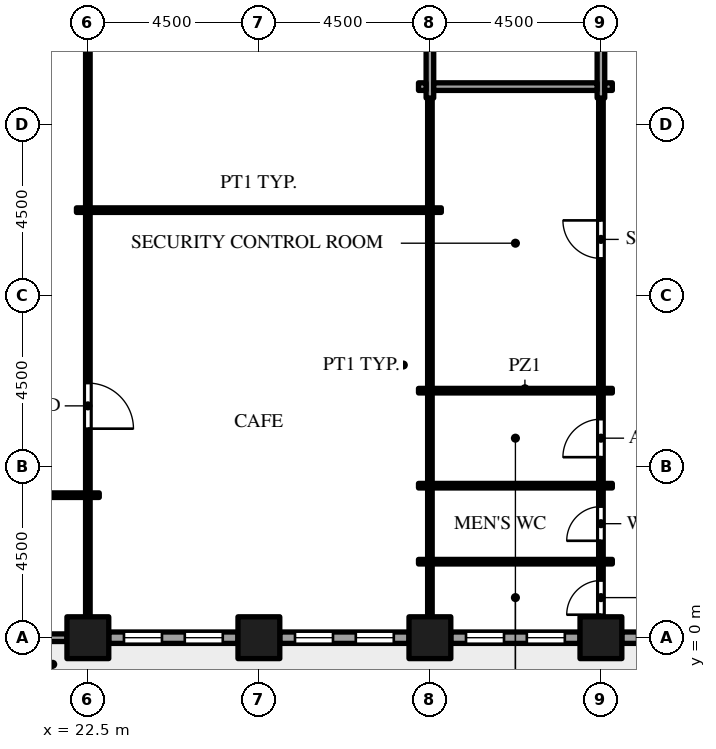
"""IFC4 building model, lengths in metres.
Left out: names, types, materials, properties, quantities, classifications, styles, units other than length and angle.
Written with IfcOpenShell. Run it as: python <this file> out.ifc"""

import sys

from ifc_helpers import new_model, si_unit, direction, frame, frame_2d, origin, origin_2d, place, context, subcontext, project, spatial, rectangle, hollow_rectangle, extrude, element, fill, save


model = new_model("IFC4")
c1 = context("Model", 3, precision=1e-05, world=origin(), true_north=direction((0.0, 1.0)))
c2 = subcontext(c1, "Body", "Model", "MODEL_VIEW")
j1 = project(units=[si_unit("LENGTHUNIT", "METRE"), si_unit("PLANEANGLEUNIT", "RADIAN")], contexts=[c1])
p1 = place(None, origin())
s1 = spatial("IfcSite", under=j1, at=p1, CompositionType="ELEMENT")
p2 = place(p1, origin())
s2 = spatial("IfcBuilding", under=s1, at=p2, CompositionType="ELEMENT")
p3 = place(p2, origin())
s3 = spatial("IfcBuildingStorey", under=s2, at=p3, CompositionType="ELEMENT", Elevation=0.0)
for number, where, z_axis, x_axis in (
    (1, (22.5, 0.0, -0.3), (0.0, 0.0, 1.0), (1.0, 0.0, 0.0)),
    (2, (27.0, 0.0, -0.3), (0.0, 0.0, 1.0), (1.0, 0.0, 0.0)),
    (3, (31.5, 0.0, -0.3), (0.0, 0.0, 1.0), (1.0, 0.0, 0.0)),
    (4, (36.0, 0.0, -0.3), (0.0, 0.0, 1.0), (1.0, 0.0, 0.0)),
):
    element("IfcColumn", number, at=place(p3, frame(where, z_axis=z_axis, x_axis=x_axis)), inside=s3, PredefinedType="COLUMN", context=c2, shape_type="SweptSolid", body=[
        extrude(hollow_rectangle(XDim=1.1, YDim=1.1, WallThickness=0.06, at=origin_2d()), origin(), (0.0, 0.0, 1.0), 8.05),
    ])
p4 = place(p3, frame((21.95, 0.0, 0.0), z_axis=(0.0, 0.0, 1.0), x_axis=(-1.0, 0.0, 0.0)))
e5 = element("IfcWall", 5, at=p4, inside=s3, PredefinedType="STANDARD", context=c2, shape_type="SweptSolid", body=[
    extrude(rectangle(XDim=3.4, YDim=0.2, at=frame_2d((1.7, 0.0))), origin(), (0.0, 0.0, 1.0), 7.036),
])
p5 = place(p4, frame((1.1, 0.0, 0.0)))
e6 = element("IfcOpeningElement", 6, at=p5, cuts=e5, PredefinedType="OPENING", context=c2, shape_type="SweptSolid", body=[
    extrude(rectangle(XDim=1.2, YDim=2.4, at=frame_2d((0.6, 1.2))), frame((0.0, 0.11, 0.0), z_axis=(0.0, -1.0, 0.0), x_axis=(1.0, 0.0, 0.0)), (0.0, 0.0, 1.0), 0.22),
])
p6 = place(p3, frame((23.05, 0.0, 0.0), z_axis=(0.0, 0.0, 1.0), x_axis=(1.0, 0.0, 0.0)))
e7 = element("IfcWall", 7, at=p6, inside=s3, PredefinedType="STANDARD", context=c2, shape_type="SweptSolid", body=[
    extrude(rectangle(XDim=3.4, YDim=0.3, at=frame_2d((1.7, 0.0))), origin(), (0.0, 0.0, 1.0), 7.036),
])
p7 = place(p6, frame((0.4, 0.0, 0.9)))
e8 = element("IfcOpeningElement", 8, at=p7, cuts=e7, PredefinedType="OPENING", context=c2, shape_type="SweptSolid", body=[
    extrude(rectangle(XDim=1.0, YDim=3.5, at=frame_2d((0.5, 1.75))), frame((0.0, 0.16, 0.0), z_axis=(0.0, -1.0, 0.0), x_axis=(1.0, 0.0, 0.0)), (0.0, 0.0, 1.0), 0.32),
])
p8 = place(p6, frame((2.0, 0.0, 0.9)))
e9 = element("IfcOpeningElement", 9, at=p8, cuts=e7, PredefinedType="OPENING", context=c2, shape_type="SweptSolid", body=[
    extrude(rectangle(XDim=1.0, YDim=3.5, at=frame_2d((0.5, 1.75))), frame((0.0, 0.16, 0.0), z_axis=(0.0, -1.0, 0.0), x_axis=(1.0, 0.0, 0.0)), (0.0, 0.0, 1.0), 0.32),
])
p9 = place(p3, frame((27.55, 0.0, 0.0), z_axis=(0.0, 0.0, 1.0), x_axis=(1.0, 0.0, 0.0)))
e10 = element("IfcWall", 10, at=p9, inside=s3, PredefinedType="STANDARD", context=c2, shape_type="SweptSolid", body=[
    extrude(rectangle(XDim=3.4, YDim=0.3, at=frame_2d((1.7, 0.0))), origin(), (0.0, 0.0, 1.0), 7.036),
])
p10 = place(p9, frame((0.4, 0.0, 0.9)))
e11 = element("IfcOpeningElement", 11, at=p10, cuts=e10, PredefinedType="OPENING", context=c2, shape_type="SweptSolid", body=[
    extrude(rectangle(XDim=1.0, YDim=3.5, at=frame_2d((0.5, 1.75))), frame((0.0, 0.16, 0.0), z_axis=(0.0, -1.0, 0.0), x_axis=(1.0, 0.0, 0.0)), (0.0, 0.0, 1.0), 0.32),
])
p11 = place(p9, frame((2.0, 0.0, 0.9)))
e12 = element("IfcOpeningElement", 12, at=p11, cuts=e10, PredefinedType="OPENING", context=c2, shape_type="SweptSolid", body=[
    extrude(rectangle(XDim=1.0, YDim=3.5, at=frame_2d((0.5, 1.75))), frame((0.0, 0.16, 0.0), z_axis=(0.0, -1.0, 0.0), x_axis=(1.0, 0.0, 0.0)), (0.0, 0.0, 1.0), 0.32),
])
p12 = place(p3, frame((32.05, 0.0, 0.0), z_axis=(0.0, 0.0, 1.0), x_axis=(1.0, 0.0, 0.0)))
e13 = element("IfcWall", 13, at=p12, inside=s3, PredefinedType="STANDARD", context=c2, shape_type="SweptSolid", body=[
    extrude(rectangle(XDim=3.4, YDim=0.3, at=frame_2d((1.7, 0.0))), origin(), (0.0, 0.0, 1.0), 7.036),
])
p13 = place(p12, frame((0.4, 0.0, 0.9)))
e14 = element("IfcOpeningElement", 14, at=p13, cuts=e13, PredefinedType="OPENING", context=c2, shape_type="SweptSolid", body=[
    extrude(rectangle(XDim=1.0, YDim=3.5, at=frame_2d((0.5, 1.75))), frame((0.0, 0.16, 0.0), z_axis=(0.0, -1.0, 0.0), x_axis=(1.0, 0.0, 0.0)), (0.0, 0.0, 1.0), 0.32),
])
p14 = place(p12, frame((2.0, 0.0, 0.9)))
e15 = element("IfcOpeningElement", 15, at=p14, cuts=e13, PredefinedType="OPENING", context=c2, shape_type="SweptSolid", body=[
    extrude(rectangle(XDim=1.0, YDim=3.5, at=frame_2d((0.5, 1.75))), frame((0.0, 0.16, 0.0), z_axis=(0.0, -1.0, 0.0), x_axis=(1.0, 0.0, 0.0)), (0.0, 0.0, 1.0), 0.32),
])
p15 = place(p3, frame((36.55, 0.0, 0.0), z_axis=(0.0, 0.0, 1.0), x_axis=(1.0, 0.0, 0.0)))
e16 = element("IfcWall", 16, at=p15, inside=s3, PredefinedType="STANDARD", context=c2, shape_type="SweptSolid", body=[
    extrude(rectangle(XDim=3.4, YDim=0.3, at=frame_2d((1.7, 0.0))), origin(), (0.0, 0.0, 1.0), 7.036),
])
p16 = place(p15, frame((0.4, 0.0, 0.9)))
e17 = element("IfcOpeningElement", 17, at=p16, cuts=e16, PredefinedType="OPENING", context=c2, shape_type="SweptSolid", body=[
    extrude(rectangle(XDim=1.0, YDim=3.5, at=frame_2d((0.5, 1.75))), frame((0.0, 0.16, 0.0), z_axis=(0.0, -1.0, 0.0), x_axis=(1.0, 0.0, 0.0)), (0.0, 0.0, 1.0), 0.32),
])
p17 = place(p15, frame((2.0, 0.0, 0.9)))
e18 = element("IfcOpeningElement", 18, at=p17, cuts=e16, PredefinedType="OPENING", context=c2, shape_type="SweptSolid", body=[
    extrude(rectangle(XDim=1.0, YDim=3.5, at=frame_2d((0.5, 1.75))), frame((0.0, 0.16, 0.0), z_axis=(0.0, -1.0, 0.0), x_axis=(1.0, 0.0, 0.0)), (0.0, 0.0, 1.0), 0.32),
])
p18 = place(p3, frame((22.5, 0.15, 0.0), z_axis=(0.0, 0.0, 1.0), x_axis=(0.0, 1.0, 0.0)))
e19 = element("IfcWall", 19, at=p18, inside=s3, PredefinedType="PARTITIONING", context=c2, shape_type="SweptSolid", body=[
    extrude(rectangle(XDim=32.85, YDim=0.12, at=frame_2d((16.425, 0.0))), origin(), (0.0, 0.0, 1.0), 6.759),
])
p19 = place(p18, frame((5.35, 0.0, 0.0)))
e20 = element("IfcOpeningElement", 20, at=p19, cuts=e19, PredefinedType="OPENING", context=c2, shape_type="SweptSolid", body=[
    extrude(rectangle(XDim=1.2, YDim=2.1, at=frame_2d((0.6, 1.05))), frame((0.0, 0.07, 0.0), z_axis=(0.0, -1.0, 0.0), x_axis=(1.0, 0.0, 0.0)), (0.0, 0.0, 1.0), 0.14),
])
p20 = place(p18, frame((16.155, 0.0, 0.0)))
e21 = element("IfcOpeningElement", 21, at=p20, cuts=e19, PredefinedType="OPENING", context=c2, shape_type="SweptSolid", body=[
    extrude(rectangle(XDim=1.2, YDim=2.1, at=frame_2d((0.6, 1.05))), frame((0.0, 0.07, 0.0), z_axis=(0.0, -1.0, 0.0), x_axis=(1.0, 0.0, 0.0)), (0.0, 0.0, 1.0), 0.14),
])
p21 = place(p18, frame((30.15, 0.0, 0.0)))
e22 = element("IfcOpeningElement", 22, at=p21, cuts=e19, PredefinedType="OPENING", context=c2, shape_type="SweptSolid", body=[
    extrude(rectangle(XDim=1.8, YDim=2.1, at=frame_2d((0.9, 1.05))), frame((0.0, 0.07, 0.0), z_axis=(0.0, -1.0, 0.0), x_axis=(1.0, 0.0, 0.0)), (0.0, 0.0, 1.0), 0.14),
])
p22 = place(p3, frame((31.5, 0.15, 0.0), z_axis=(0.0, 0.0, 1.0), x_axis=(0.0, 1.0, 0.0)))
e23 = element("IfcWall", 23, at=p22, inside=s3, PredefinedType="PARTITIONING", context=c2, shape_type="SweptSolid", body=[
    extrude(rectangle(XDim=14.05, YDim=0.12, at=frame_2d((7.025, 0.0))), origin(), (0.0, 0.0, 1.0), 6.759),
])
p23 = place(p3, frame((31.5, 14.2, 0.0), z_axis=(0.0, 0.0, 1.0), x_axis=(0.0, 1.0, 0.0)))
e24 = element("IfcWall", 24, at=p23, inside=s3, PredefinedType="PARTITIONING", context=c2, shape_type="SweptSolid", body=[
    extrude(rectangle(XDim=8.6, YDim=0.2, at=frame_2d((4.3, 0.0))), origin(), (0.0, 0.0, 1.0), 6.759),
])
p24 = place(p3, frame((36.0, 0.15, 0.0), z_axis=(0.0, 0.0, 1.0), x_axis=(0.0, 1.0, 0.0)))
e25 = element("IfcWall", 25, at=p24, inside=s3, PredefinedType="PARTITIONING", context=c2, shape_type="SweptSolid", body=[
    extrude(rectangle(XDim=14.05, YDim=0.12, at=frame_2d((7.025, 0.0))), origin(), (0.0, 0.0, 1.0), 6.759),
])
p25 = place(p24, frame((9.83, 0.0, 0.0)))
e26 = element("IfcOpeningElement", 26, at=p25, cuts=e25, PredefinedType="OPENING", context=c2, shape_type="SweptSolid", body=[
    extrude(rectangle(XDim=1.0, YDim=2.1, at=frame_2d((0.5, 1.05))), frame((0.0, 0.07, 0.0), z_axis=(0.0, -1.0, 0.0), x_axis=(1.0, 0.0, 0.0)), (0.0, 0.0, 1.0), 0.14),
])
p26 = place(p24, frame((0.455, 0.0, 0.0)))
e27 = element("IfcOpeningElement", 27, at=p26, cuts=e25, PredefinedType="OPENING", context=c2, shape_type="SweptSolid", body=[
    extrude(rectangle(XDim=0.9, YDim=2.1, at=frame_2d((0.45, 1.05))), frame((0.0, 0.07, 0.0), z_axis=(0.0, -1.0, 0.0), x_axis=(1.0, 0.0, 0.0)), (0.0, 0.0, 1.0), 0.14),
])
p27 = place(p24, frame((2.4, 0.0, 0.0)))
e28 = element("IfcOpeningElement", 28, at=p27, cuts=e25, PredefinedType="OPENING", context=c2, shape_type="SweptSolid", body=[
    extrude(rectangle(XDim=0.9, YDim=2.1, at=frame_2d((0.45, 1.05))), frame((0.0, 0.07, 0.0), z_axis=(0.0, -1.0, 0.0), x_axis=(1.0, 0.0, 0.0)), (0.0, 0.0, 1.0), 0.14),
])
p28 = place(p24, frame((4.6, 0.0, 0.0)))
e29 = element("IfcOpeningElement", 29, at=p28, cuts=e25, PredefinedType="OPENING", context=c2, shape_type="SweptSolid", body=[
    extrude(rectangle(XDim=1.0, YDim=2.1, at=frame_2d((0.5, 1.05))), frame((0.0, 0.07, 0.0), z_axis=(0.0, -1.0, 0.0), x_axis=(1.0, 0.0, 0.0)), (0.0, 0.0, 1.0), 0.14),
])
p29 = place(p3, frame((36.0, 14.2, 0.0), z_axis=(0.0, 0.0, 1.0), x_axis=(0.0, 1.0, 0.0)))
e30 = element("IfcWall", 30, at=p29, inside=s3, PredefinedType="PARTITIONING", context=c2, shape_type="SweptSolid", body=[
    extrude(rectangle(XDim=8.6, YDim=0.2, at=frame_2d((4.3, 0.0))), origin(), (0.0, 0.0, 1.0), 6.759),
])
p30 = place(p29, frame((3.8, 0.0, 0.0)))
e31 = element("IfcOpeningElement", 31, at=p30, cuts=e30, PredefinedType="OPENING", context=c2, shape_type="SweptSolid", body=[
    extrude(rectangle(XDim=1.0, YDim=2.1, at=frame_2d((0.5, 1.05))), frame((0.0, 0.11, 0.0), z_axis=(0.0, -1.0, 0.0), x_axis=(1.0, 0.0, 0.0)), (0.0, 0.0, 1.0), 0.22),
])
p31 = place(p3, frame((31.2, 2.0, 0.0), z_axis=(0.0, 0.0, 1.0), x_axis=(1.0, 0.0, 0.0)))
e32 = element("IfcWall", 32, at=p31, inside=s3, PredefinedType="PARTITIONING", context=c2, shape_type="SweptSolid", body=[
    extrude(rectangle(XDim=0.24, YDim=0.12, at=frame_2d((0.12, 0.0))), origin(), (0.0, 0.0, 1.0), 6.759),
])
p32 = place(p3, frame((31.56, 2.0, 0.0), z_axis=(0.0, 0.0, 1.0), x_axis=(1.0, 0.0, 0.0)))
e33 = element("IfcWall", 33, at=p32, inside=s3, PredefinedType="PARTITIONING", context=c2, shape_type="SweptSolid", body=[
    extrude(rectangle(XDim=4.38, YDim=0.12, at=frame_2d((2.19, 0.0))), origin(), (0.0, 0.0, 1.0), 6.66),
])
p33 = place(p3, frame((36.06, 2.0, 0.0), z_axis=(0.0, 0.0, 1.0), x_axis=(1.0, 0.0, 0.0)))
e34 = element("IfcWall", 34, at=p33, inside=s3, PredefinedType="PARTITIONING", context=c2, shape_type="SweptSolid", body=[
    extrude(rectangle(XDim=0.24, YDim=0.12, at=frame_2d((0.12, 0.0))), origin(), (0.0, 0.0, 1.0), 6.759),
])
p34 = place(p3, frame((15.81, 3.75, 0.0), z_axis=(0.0, 0.0, 1.0), x_axis=(1.0, 0.0, 0.0)))
e35 = element("IfcWall", 35, at=p34, inside=s3, PredefinedType="PARTITIONING", context=c2, shape_type="SweptSolid", body=[
    extrude(rectangle(XDim=6.63, YDim=0.12, at=frame_2d((3.315, 0.0))), origin(), (0.0, 0.0, 1.0), 6.759),
])
p35 = place(p34, frame((2.815, 0.0, 0.0)))
e36 = element("IfcOpeningElement", 36, at=p35, cuts=e35, PredefinedType="OPENING", context=c2, shape_type="SweptSolid", body=[
    extrude(rectangle(XDim=1.0, YDim=2.1, at=frame_2d((0.5, 1.05))), frame((0.0, 0.07, 0.0), z_axis=(0.0, -1.0, 0.0), x_axis=(1.0, 0.0, 0.0)), (0.0, 0.0, 1.0), 0.14),
])
for number, where, z_axis, x_axis in (
    (37, (22.56, 3.75, 0.0), (0.0, 0.0, 1.0), (1.0, 0.0, 0.0)),
    (38, (31.2, 4.0, 0.0), (0.0, 0.0, 1.0), (1.0, 0.0, 0.0)),
):
    element("IfcWall", number, at=place(p3, frame(where, z_axis=z_axis, x_axis=x_axis)), inside=s3, PredefinedType="PARTITIONING", context=c2, shape_type="SweptSolid", body=[
        extrude(rectangle(XDim=0.24, YDim=0.12, at=frame_2d((0.12, 0.0))), origin(), (0.0, 0.0, 1.0), 6.759),
    ])
p36 = place(p3, frame((31.56, 4.0, 0.0), z_axis=(0.0, 0.0, 1.0), x_axis=(1.0, 0.0, 0.0)))
e39 = element("IfcWall", 39, at=p36, inside=s3, PredefinedType="PARTITIONING", context=c2, shape_type="SweptSolid", body=[
    extrude(rectangle(XDim=4.38, YDim=0.12, at=frame_2d((2.19, 0.0))), origin(), (0.0, 0.0, 1.0), 6.66),
])
for number, where, z_axis, x_axis in (
    (40, (36.06, 4.0, 0.0), (0.0, 0.0, 1.0), (1.0, 0.0, 0.0)),
    (41, (31.2, 6.5, 0.0), (0.0, 0.0, 1.0), (1.0, 0.0, 0.0)),
):
    element("IfcWall", number, at=place(p3, frame(where, z_axis=z_axis, x_axis=x_axis)), inside=s3, PredefinedType="PARTITIONING", context=c2, shape_type="SweptSolid", body=[
        extrude(rectangle(XDim=0.24, YDim=0.12, at=frame_2d((0.12, 0.0))), origin(), (0.0, 0.0, 1.0), 6.759),
    ])
p37 = place(p3, frame((31.56, 6.5, 0.0), z_axis=(0.0, 0.0, 1.0), x_axis=(1.0, 0.0, 0.0)))
e42 = element("IfcWall", 42, at=p37, inside=s3, PredefinedType="PARTITIONING", context=c2, shape_type="SweptSolid", body=[
    extrude(rectangle(XDim=4.38, YDim=0.12, at=frame_2d((2.19, 0.0))), origin(), (0.0, 0.0, 1.0), 6.66),
])
for number, where, z_axis, x_axis in (
    (43, (36.06, 6.5, 0.0), (0.0, 0.0, 1.0), (1.0, 0.0, 0.0)),
    (44, (22.2, 11.25, 0.0), (0.0, 0.0, 1.0), (1.0, 0.0, 0.0)),
):
    element("IfcWall", number, at=place(p3, frame(where, z_axis=z_axis, x_axis=x_axis)), inside=s3, PredefinedType="PARTITIONING", context=c2, shape_type="SweptSolid", body=[
        extrude(rectangle(XDim=0.24, YDim=0.12, at=frame_2d((0.12, 0.0))), origin(), (0.0, 0.0, 1.0), 6.759),
    ])
p38 = place(p3, frame((22.56, 11.25, 0.0), z_axis=(0.0, 0.0, 1.0), x_axis=(1.0, 0.0, 0.0)))
e45 = element("IfcWall", 45, at=p38, inside=s3, PredefinedType="PARTITIONING", context=c2, shape_type="SweptSolid", body=[
    extrude(rectangle(XDim=8.88, YDim=0.12, at=frame_2d((4.44, 0.0))), origin(), (0.0, 0.0, 1.0), 6.66),
])
p39 = place(p3, frame((31.56, 11.25, 0.0), z_axis=(0.0, 0.0, 1.0), x_axis=(1.0, 0.0, 0.0)))
e46 = element("IfcWall", 46, at=p39, inside=s3, PredefinedType="PARTITIONING", context=c2, shape_type="SweptSolid", body=[
    extrude(rectangle(XDim=0.24, YDim=0.12, at=frame_2d((0.12, 0.0))), origin(), (0.0, 0.0, 1.0), 6.759),
])
p40 = place(p3, frame((31.2, 14.5, 0.0), z_axis=(0.0, 0.0, 1.0), x_axis=(1.0, 0.0, 0.0)))
e47 = element("IfcWall", 47, at=p40, inside=s3, PredefinedType="PARTITIONING", context=c2, shape_type="SweptSolid", body=[
    extrude(rectangle(XDim=0.2, YDim=0.2, at=frame_2d((0.1, 0.0))), origin(), (0.0, 0.0, 1.0), 6.759),
])
p41 = place(p3, frame((31.6, 14.5, 0.0), z_axis=(0.0, 0.0, 1.0), x_axis=(1.0, 0.0, 0.0)))
e48 = element("IfcWall", 48, at=p41, inside=s3, PredefinedType="PARTITIONING", context=c2, shape_type="SweptSolid", body=[
    extrude(rectangle(XDim=4.3, YDim=0.2, at=frame_2d((2.15, 0.0))), origin(), (0.0, 0.0, 1.0), 6.66),
])
p42 = place(p3, frame((36.1, 14.5, 0.0), z_axis=(0.0, 0.0, 1.0), x_axis=(1.0, 0.0, 0.0)))
e49 = element("IfcWall", 49, at=p42, inside=s3, PredefinedType="PARTITIONING", context=c2, shape_type="SweptSolid", body=[
    extrude(rectangle(XDim=0.2, YDim=0.2, at=frame_2d((0.1, 0.0))), origin(), (0.0, 0.0, 1.0), 6.759),
])
p43 = place(p7, origin())
e50 = element("IfcWindow", 50, at=p43, inside=s3, PartitioningType="SINGLE_PANEL", PredefinedType="WINDOW", context=c2, shape_type="SweptSolid", body=[
    extrude(rectangle(XDim=1.0, YDim=3.5, at=frame_2d((0.5, 1.75))), frame((0.0, 0.03, 0.0), z_axis=(0.0, -1.0, 0.0), x_axis=(1.0, 0.0, 0.0)), (0.0, 0.0, 1.0), 0.06),
])
fill(e8, e50)
p44 = place(p8, origin())
e51 = element("IfcWindow", 51, at=p44, inside=s3, PartitioningType="SINGLE_PANEL", PredefinedType="WINDOW", context=c2, shape_type="SweptSolid", body=[
    extrude(rectangle(XDim=1.0, YDim=3.5, at=frame_2d((0.5, 1.75))), frame((0.0, 0.03, 0.0), z_axis=(0.0, -1.0, 0.0), x_axis=(1.0, 0.0, 0.0)), (0.0, 0.0, 1.0), 0.06),
])
fill(e9, e51)
p45 = place(p10, origin())
e52 = element("IfcWindow", 52, at=p45, inside=s3, PartitioningType="SINGLE_PANEL", PredefinedType="WINDOW", context=c2, shape_type="SweptSolid", body=[
    extrude(rectangle(XDim=1.0, YDim=3.5, at=frame_2d((0.5, 1.75))), frame((0.0, 0.03, 0.0), z_axis=(0.0, -1.0, 0.0), x_axis=(1.0, 0.0, 0.0)), (0.0, 0.0, 1.0), 0.06),
])
fill(e11, e52)
p46 = place(p11, origin())
e53 = element("IfcWindow", 53, at=p46, inside=s3, PartitioningType="SINGLE_PANEL", PredefinedType="WINDOW", context=c2, shape_type="SweptSolid", body=[
    extrude(rectangle(XDim=1.0, YDim=3.5, at=frame_2d((0.5, 1.75))), frame((0.0, 0.03, 0.0), z_axis=(0.0, -1.0, 0.0), x_axis=(1.0, 0.0, 0.0)), (0.0, 0.0, 1.0), 0.06),
])
fill(e12, e53)
p47 = place(p13, origin())
e54 = element("IfcWindow", 54, at=p47, inside=s3, PartitioningType="SINGLE_PANEL", PredefinedType="WINDOW", context=c2, shape_type="SweptSolid", body=[
    extrude(rectangle(XDim=1.0, YDim=3.5, at=frame_2d((0.5, 1.75))), frame((0.0, 0.03, 0.0), z_axis=(0.0, -1.0, 0.0), x_axis=(1.0, 0.0, 0.0)), (0.0, 0.0, 1.0), 0.06),
])
fill(e14, e54)
p48 = place(p14, origin())
e55 = element("IfcWindow", 55, at=p48, inside=s3, PartitioningType="SINGLE_PANEL", PredefinedType="WINDOW", context=c2, shape_type="SweptSolid", body=[
    extrude(rectangle(XDim=1.0, YDim=3.5, at=frame_2d((0.5, 1.75))), frame((0.0, 0.03, 0.0), z_axis=(0.0, -1.0, 0.0), x_axis=(1.0, 0.0, 0.0)), (0.0, 0.0, 1.0), 0.06),
])
fill(e15, e55)
p49 = place(p25, origin())
e56 = element("IfcDoor", 56, at=p49, inside=s3, OperationType="SINGLE_SWING_RIGHT", PredefinedType="DOOR", context=c2, shape_type="SweptSolid", body=[
    extrude(rectangle(XDim=1.0, YDim=2.1, at=frame_2d((0.5, 1.05))), frame((0.0, 0.025, 0.0), z_axis=(0.0, -1.0, 0.0), x_axis=(1.0, 0.0, 0.0)), (0.0, 0.0, 1.0), 0.05),
])
fill(e26, e56)
p50 = place(p26, origin())
e57 = element("IfcDoor", 57, at=p50, inside=s3, OperationType="SINGLE_SWING_LEFT", PredefinedType="DOOR", context=c2, shape_type="SweptSolid", body=[
    extrude(rectangle(XDim=0.9, YDim=2.1, at=frame_2d((0.45, 1.05))), frame((0.0, 0.025, 0.0), z_axis=(0.0, -1.0, 0.0), x_axis=(1.0, 0.0, 0.0)), (0.0, 0.0, 1.0), 0.05),
])
fill(e27, e57)
p51 = place(p27, origin())
e58 = element("IfcDoor", 58, at=p51, inside=s3, OperationType="SINGLE_SWING_LEFT", PredefinedType="DOOR", context=c2, shape_type="SweptSolid", body=[
    extrude(rectangle(XDim=0.9, YDim=2.1, at=frame_2d((0.45, 1.05))), frame((0.0, 0.025, 0.0), z_axis=(0.0, -1.0, 0.0), x_axis=(1.0, 0.0, 0.0)), (0.0, 0.0, 1.0), 0.05),
])
fill(e28, e58)
p52 = place(p28, origin())
e59 = element("IfcDoor", 59, at=p52, inside=s3, OperationType="SINGLE_SWING_LEFT", PredefinedType="DOOR", context=c2, shape_type="SweptSolid", body=[
    extrude(rectangle(XDim=1.0, YDim=2.1, at=frame_2d((0.5, 1.05))), frame((0.0, 0.025, 0.0), z_axis=(0.0, -1.0, 0.0), x_axis=(1.0, 0.0, 0.0)), (0.0, 0.0, 1.0), 0.05),
])
fill(e29, e59)
p53 = place(p19, origin())
e60 = element("IfcDoor", 60, at=p53, inside=s3, OperationType="SINGLE_SWING_LEFT", PredefinedType="DOOR", context=c2, shape_type="SweptSolid", body=[
    extrude(rectangle(XDim=1.2, YDim=2.1, at=frame_2d((0.6, 1.05))), frame((0.0, 0.025, 0.0), z_axis=(0.0, -1.0, 0.0), x_axis=(1.0, 0.0, 0.0)), (0.0, 0.0, 1.0), 0.05),
])
fill(e20, e60)
save(model, sys.argv[1])
